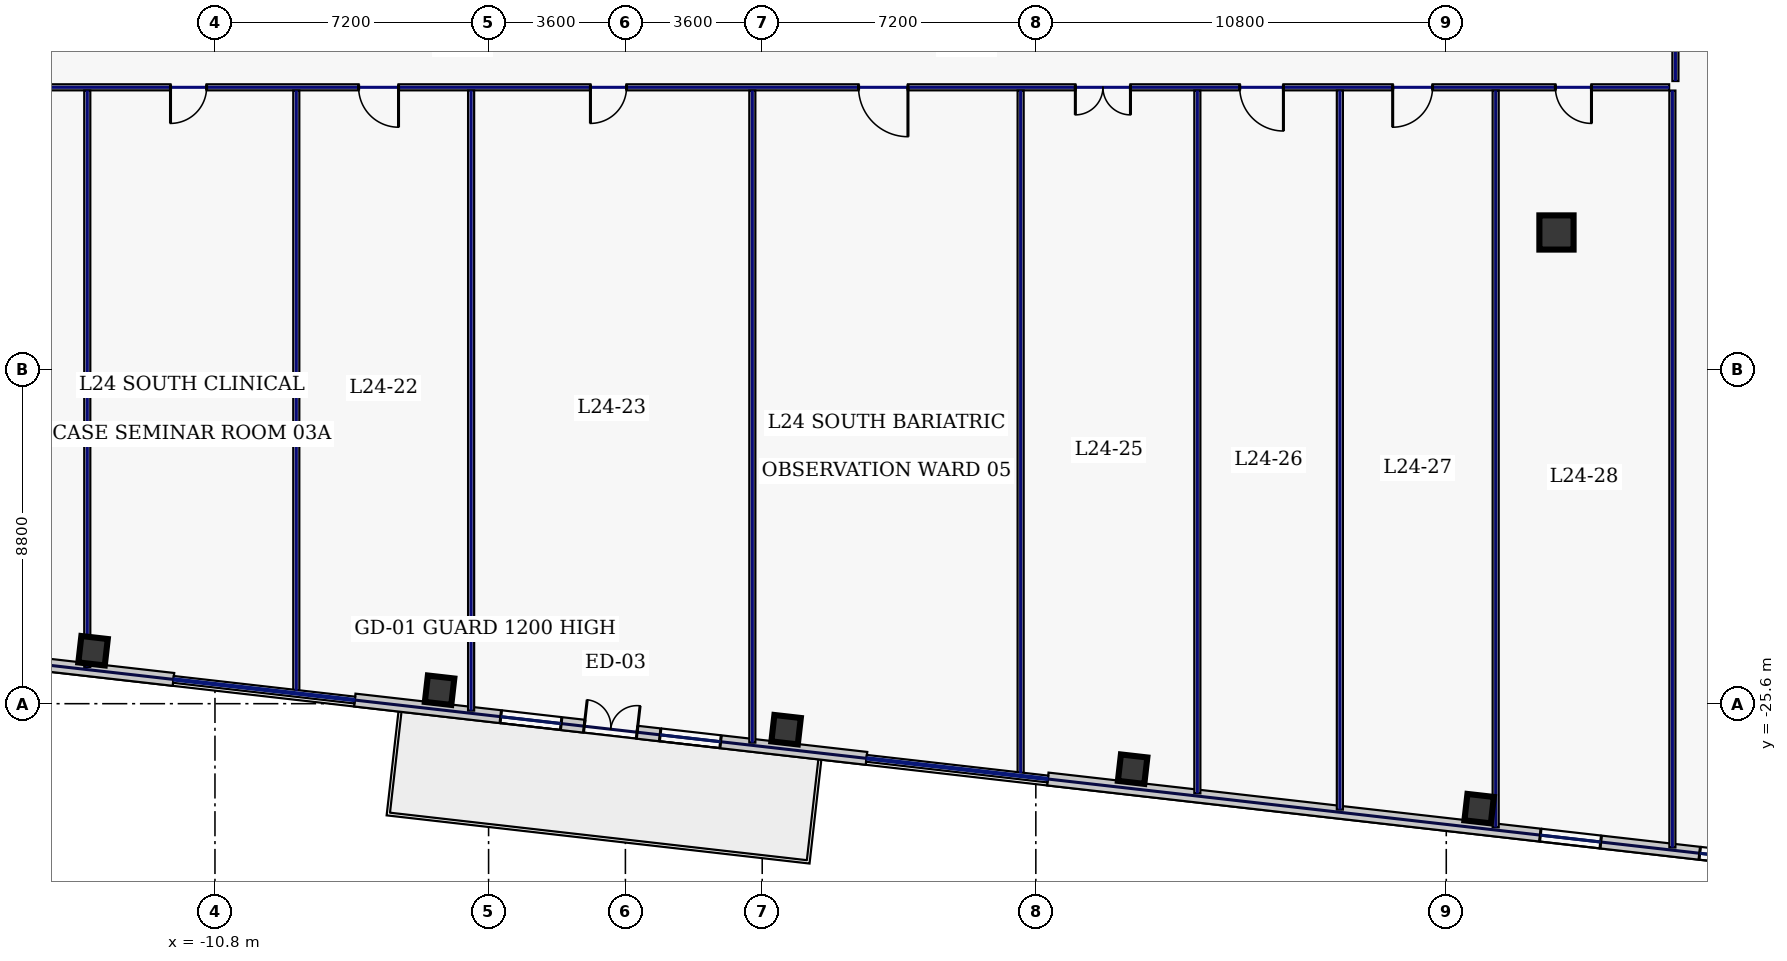
"""IFC4 building model, lengths in metres.
Left out: names, types, materials, properties, quantities, classifications, styles, units other than length and angle.
Written with IfcOpenShell. Run it as: python <this file> out.ifc"""

import sys

from ifc_helpers import new_model, si_unit, direction, frame, frame_2d, origin, origin_2d, place, context, subcontext, project, spatial, rectangle, hollow_rectangle, extrude, element, fill, save


model = new_model("IFC4")
c1 = context("Model", 3, precision=1e-05, world=origin(), true_north=direction((0.0, 1.0)))
c2 = subcontext(c1, "Body", "Model", "MODEL_VIEW")
j1 = project(units=[si_unit("LENGTHUNIT", "METRE"), si_unit("PLANEANGLEUNIT", "RADIAN")], contexts=[c1])
p1 = place(None, origin())
s1 = spatial("IfcSite", under=j1, at=p1, CompositionType="ELEMENT")
p2 = place(p1, origin())
s2 = spatial("IfcBuilding", under=s1, at=p2, CompositionType="ELEMENT")
p3 = place(p2, frame((0.0, 0.0, 109.4)))
s3 = spatial("IfcBuildingStorey", under=s2, at=p3, CompositionType="ELEMENT", Elevation=109.4)
p4 = place(p3, frame((24.5, -13.2, 0.0), z_axis=(0.0, 0.0, 1.0), x_axis=(1.0, 0.0, 0.0)))
e1 = element("IfcColumn", 1, at=p4, inside=s3, PredefinedType="COLUMN", context=c2, shape_type="SweptSolid", body=[
    extrude(hollow_rectangle(XDim=0.9, YDim=0.9, WallThickness=0.04, at=origin_2d()), origin(), (0.0, 0.0, 1.0), 3.74),
])
for number, where, z_axis, x_axis in (
    (2, (-14.008, -24.207, 0.0), (0.0, 0.0, 1.0), (0.994, -0.113, 0.0)),
    (3, (-4.89, -25.246, 0.0), (0.0, 0.0, 1.0), (0.994, -0.113, 0.0)),
    (4, (4.229, -26.284, 0.0), (0.0, 0.0, 1.0), (0.994, -0.113, 0.0)),
    (5, (13.347, -27.323, 0.0), (0.0, 0.0, 1.0), (0.994, -0.113, 0.0)),
    (6, (22.465, -28.362, 0.0), (0.0, 0.0, 1.0), (0.994, -0.113, 0.0)),
):
    element("IfcColumn", number, at=place(p3, frame(where, z_axis=z_axis, x_axis=x_axis)), inside=s3, PredefinedType="COLUMN", context=c2, shape_type="SweptSolid", body=[
        extrude(hollow_rectangle(XDim=0.7, YDim=0.7, WallThickness=0.032, at=origin_2d()), origin(), (0.0, 0.0, 1.0), 3.74),
    ])
p5 = place(p3, frame((-32.977, -22.559, 0.0), z_axis=(0.0, 0.0, 1.0), x_axis=(0.993571214605, -0.113208840243, 0.0)))
e7 = element("IfcWall", 7, at=p5, inside=s3, PredefinedType="STANDARD", context=c2, shape_type="SweptSolid", body=[
    extrude(rectangle(XDim=21.223, YDim=0.34, at=frame_2d((10.611, 0.0))), origin(), (0.0, 0.0, 1.0), 3.74),
])
p6 = place(p5, frame((2.358, 0.0, 0.22)))
e8 = element("IfcOpeningElement", 8, at=p6, cuts=e7, PredefinedType="OPENING", context=c2, shape_type="SweptSolid", body=[
    extrude(rectangle(XDim=1.6, YDim=1.2, at=frame_2d((0.8, 0.6))), frame((0.0, 0.18, 0.0), z_axis=(0.0, -1.0, 0.0), x_axis=(1.0, 0.0, 0.0)), (0.0, 0.0, 1.0), 0.36),
])
p7 = place(p5, frame((6.579, 0.0, 0.22)))
e9 = element("IfcOpeningElement", 9, at=p7, cuts=e7, PredefinedType="OPENING", context=c2, shape_type="SweptSolid", body=[
    extrude(rectangle(XDim=1.6, YDim=1.2, at=frame_2d((0.8, 0.6))), frame((0.0, 0.18, 0.0), z_axis=(0.0, -1.0, 0.0), x_axis=(1.0, 0.0, 0.0)), (0.0, 0.0, 1.0), 0.36),
])
p8 = place(p5, frame((11.535, 0.0, 0.22)))
e10 = element("IfcOpeningElement", 10, at=p8, cuts=e7, PredefinedType="OPENING", context=c2, shape_type="SweptSolid", body=[
    extrude(rectangle(XDim=1.6, YDim=1.2, at=frame_2d((0.8, 0.6))), frame((0.0, 0.18, 0.0), z_axis=(0.0, -1.0, 0.0), x_axis=(1.0, 0.0, 0.0)), (0.0, 0.0, 1.0), 0.36),
])
p9 = place(p5, frame((15.756, 0.0, 0.22)))
e11 = element("IfcOpeningElement", 11, at=p9, cuts=e7, PredefinedType="OPENING", context=c2, shape_type="SweptSolid", body=[
    extrude(rectangle(XDim=1.6, YDim=1.2, at=frame_2d((0.8, 0.6))), frame((0.0, 0.18, 0.0), z_axis=(0.0, -1.0, 0.0), x_axis=(1.0, 0.0, 0.0)), (0.0, 0.0, 1.0), 0.36),
])
p10 = place(p3, frame((-7.122, -25.504, 0.0), z_axis=(0.0, 0.0, 1.0), x_axis=(0.993571685551, -0.11320470693, 0.0)))
e12 = element("IfcWall", 12, at=p10, inside=s3, PredefinedType="STANDARD", context=c2, shape_type="SweptSolid", body=[
    extrude(rectangle(XDim=13.554, YDim=0.34, at=frame_2d((6.777, 0.0))), origin(), (0.0, 0.0, 1.0), 3.74),
])
p11 = place(p10, frame((6.077, 0.0, 0.0)))
e13 = element("IfcOpeningElement", 13, at=p11, cuts=e12, PredefinedType="OPENING", context=c2, shape_type="SweptSolid", body=[
    extrude(rectangle(XDim=1.4, YDim=2.2, at=frame_2d((0.7, 1.1))), frame((0.0, 0.18, 0.0), z_axis=(0.0, -1.0, 0.0), x_axis=(1.0, 0.0, 0.0)), (0.0, 0.0, 1.0), 0.36),
])
p12 = place(p10, frame((3.866, 0.0, 0.22)))
e14 = element("IfcOpeningElement", 14, at=p12, cuts=e12, PredefinedType="OPENING", context=c2, shape_type="SweptSolid", body=[
    extrude(rectangle(XDim=1.6, YDim=1.2, at=frame_2d((0.8, 0.6))), frame((0.0, 0.18, 0.0), z_axis=(0.0, -1.0, 0.0), x_axis=(1.0, 0.0, 0.0)), (0.0, 0.0, 1.0), 0.36),
])
p13 = place(p10, frame((8.088, 0.0, 0.22)))
e15 = element("IfcOpeningElement", 15, at=p13, cuts=e12, PredefinedType="OPENING", context=c2, shape_type="SweptSolid", body=[
    extrude(rectangle(XDim=1.6, YDim=1.2, at=frame_2d((0.8, 0.6))), frame((0.0, 0.18, 0.0), z_axis=(0.0, -1.0, 0.0), x_axis=(1.0, 0.0, 0.0)), (0.0, 0.0, 1.0), 0.36),
])
p14 = place(p3, frame((11.115, -27.582, 0.0), z_axis=(0.0, 0.0, 1.0), x_axis=(0.993572655904, -0.113196190044, 0.0)))
e16 = element("IfcWall", 16, at=p14, inside=s3, PredefinedType="STANDARD", context=c2, shape_type="SweptSolid", body=[
    extrude(rectangle(XDim=21.223, YDim=0.34, at=frame_2d((10.611, 0.0))), origin(), (0.0, 0.0, 1.0), 3.74),
])
p15 = place(p14, frame((13.044, 0.0, 0.22)))
e17 = element("IfcOpeningElement", 17, at=p15, cuts=e16, PredefinedType="OPENING", context=c2, shape_type="SweptSolid", body=[
    extrude(rectangle(XDim=1.6, YDim=1.2, at=frame_2d((0.8, 0.6))), frame((0.0, 0.18, 0.0), z_axis=(0.0, -1.0, 0.0), x_axis=(1.0, 0.0, 0.0)), (0.0, 0.0, 1.0), 0.36),
])
p16 = place(p14, frame((17.265, 0.0, 0.22)))
e18 = element("IfcOpeningElement", 18, at=p16, cuts=e16, PredefinedType="OPENING", context=c2, shape_type="SweptSolid", body=[
    extrude(rectangle(XDim=1.6, YDim=1.2, at=frame_2d((0.8, 0.6))), frame((0.0, 0.18, 0.0), z_axis=(0.0, -1.0, 0.0), x_axis=(1.0, 0.0, 0.0)), (0.0, 0.0, 1.0), 0.36),
])
p17 = place(p3, frame((27.63, 9.415, 0.0), z_axis=(0.0, 0.0, 1.0), x_axis=(0.0, -1.0, 0.0)))
e19 = element("IfcWall", 19, at=p17, inside=s3, PredefinedType="PARTITIONING", context=c2, shape_type="SweptSolid", body=[
    extrude(rectangle(XDim=18.63, YDim=0.16, at=frame_2d((9.315, 0.0))), origin(), (0.0, 0.0, 1.0), 3.74),
])
p18 = place(p17, frame((16.081, 0.0, 0.0)))
e20 = element("IfcOpeningElement", 20, at=p18, cuts=e19, PredefinedType="OPENING", context=c2, shape_type="SweptSolid", body=[
    extrude(rectangle(XDim=0.95, YDim=2.2, at=frame_2d((0.475, 1.1))), frame((0.0, 0.09, 0.0), z_axis=(0.0, -1.0, 0.0), x_axis=(1.0, 0.0, 0.0)), (0.0, 0.0, 1.0), 0.18),
])
p19 = place(p17, frame((12.25, 0.0, 0.0)))
e21 = element("IfcOpeningElement", 21, at=p19, cuts=e19, PredefinedType="OPENING", context=c2, shape_type="SweptSolid", body=[
    extrude(rectangle(XDim=0.95, YDim=2.2, at=frame_2d((0.475, 1.1))), frame((0.0, 0.09, 0.0), z_axis=(0.0, -1.0, 0.0), x_axis=(1.0, 0.0, 0.0)), (0.0, 0.0, 1.0), 0.18),
])
p20 = place(p17, frame((6.75, 0.0, 0.0)))
e22 = element("IfcOpeningElement", 22, at=p20, cuts=e19, PredefinedType="OPENING", context=c2, shape_type="SweptSolid", body=[
    extrude(rectangle(XDim=0.95, YDim=2.2, at=frame_2d((0.475, 1.1))), frame((0.0, 0.09, 0.0), z_axis=(0.0, -1.0, 0.0), x_axis=(1.0, 0.0, 0.0)), (0.0, 0.0, 1.0), 0.18),
])
p21 = place(p17, frame((1.869, 0.0, 0.0)))
e23 = element("IfcOpeningElement", 23, at=p21, cuts=e19, PredefinedType="OPENING", context=c2, shape_type="SweptSolid", body=[
    extrude(rectangle(XDim=0.95, YDim=2.2, at=frame_2d((0.475, 1.1))), frame((0.0, 0.09, 0.0), z_axis=(0.0, -1.0, 0.0), x_axis=(1.0, 0.0, 0.0)), (0.0, 0.0, 1.0), 0.18),
])
p22 = place(p3, frame((27.465, -9.38, 0.0), z_axis=(0.0, 0.0, 1.0), x_axis=(-1.0, 0.0, 0.0)))
e24 = element("IfcWall", 24, at=p22, inside=s3, PredefinedType="PARTITIONING", context=c2, shape_type="SweptSolid", body=[
    extrude(rectangle(XDim=54.93, YDim=0.16, at=frame_2d((27.465, 0.0))), origin(), (0.0, 0.0, 1.0), 3.74),
])
p23 = place(p22, frame((51.931, 0.0, 0.0)))
e25 = element("IfcOpeningElement", 25, at=p23, cuts=e24, PredefinedType="OPENING", context=c2, shape_type="SweptSolid", body=[
    extrude(rectangle(XDim=1.45, YDim=2.2, at=frame_2d((0.725, 1.1))), frame((0.0, 0.09, 0.0), z_axis=(0.0, -1.0, 0.0), x_axis=(1.0, 0.0, 0.0)), (0.0, 0.0, 1.0), 0.18),
])
p24 = place(p22, frame((45.605, 0.0, 0.0)))
e26 = element("IfcOpeningElement", 26, at=p24, cuts=e24, PredefinedType="OPENING", context=c2, shape_type="SweptSolid", body=[
    extrude(rectangle(XDim=0.95, YDim=2.2, at=frame_2d((0.475, 1.1))), frame((0.0, 0.09, 0.0), z_axis=(0.0, -1.0, 0.0), x_axis=(1.0, 0.0, 0.0)), (0.0, 0.0, 1.0), 0.18),
])
p25 = place(p22, frame((38.485, 0.0, 0.0)))
e27 = element("IfcOpeningElement", 27, at=p25, cuts=e24, PredefinedType="OPENING", context=c2, shape_type="SweptSolid", body=[
    extrude(rectangle(XDim=0.95, YDim=2.2, at=frame_2d((0.475, 1.1))), frame((0.0, 0.09, 0.0), z_axis=(0.0, -1.0, 0.0), x_axis=(1.0, 0.0, 0.0)), (0.0, 0.0, 1.0), 0.18),
])
p26 = place(p22, frame((33.435, 0.0, 0.0)))
e28 = element("IfcOpeningElement", 28, at=p26, cuts=e24, PredefinedType="OPENING", context=c2, shape_type="SweptSolid", body=[
    extrude(rectangle(XDim=1.05, YDim=2.2, at=frame_2d((0.525, 1.1))), frame((0.0, 0.09, 0.0), z_axis=(0.0, -1.0, 0.0), x_axis=(1.0, 0.0, 0.0)), (0.0, 0.0, 1.0), 0.18),
])
p27 = place(p22, frame((27.435, 0.0, 0.0)))
e29 = element("IfcOpeningElement", 29, at=p27, cuts=e24, PredefinedType="OPENING", context=c2, shape_type="SweptSolid", body=[
    extrude(rectangle(XDim=0.95, YDim=2.2, at=frame_2d((0.475, 1.1))), frame((0.0, 0.09, 0.0), z_axis=(0.0, -1.0, 0.0), x_axis=(1.0, 0.0, 0.0)), (0.0, 0.0, 1.0), 0.18),
])
p28 = place(p22, frame((20.03, 0.0, 0.0)))
e30 = element("IfcOpeningElement", 30, at=p28, cuts=e24, PredefinedType="OPENING", context=c2, shape_type="SweptSolid", body=[
    extrude(rectangle(XDim=1.3, YDim=2.2, at=frame_2d((0.65, 1.1))), frame((0.0, 0.09, 0.0), z_axis=(0.0, -1.0, 0.0), x_axis=(1.0, 0.0, 0.0)), (0.0, 0.0, 1.0), 0.18),
])
p29 = place(p22, frame((14.175, 0.0, 0.0)))
e31 = element("IfcOpeningElement", 31, at=p29, cuts=e24, PredefinedType="OPENING", context=c2, shape_type="SweptSolid", body=[
    extrude(rectangle(XDim=1.45, YDim=2.2, at=frame_2d((0.725, 1.1))), frame((0.0, 0.09, 0.0), z_axis=(0.0, -1.0, 0.0), x_axis=(1.0, 0.0, 0.0)), (0.0, 0.0, 1.0), 0.18),
])
p30 = place(p22, frame((10.15, 0.0, 0.0)))
e32 = element("IfcOpeningElement", 32, at=p30, cuts=e24, PredefinedType="OPENING", context=c2, shape_type="SweptSolid", body=[
    extrude(rectangle(XDim=1.15, YDim=2.2, at=frame_2d((0.575, 1.1))), frame((0.0, 0.09, 0.0), z_axis=(0.0, -1.0, 0.0), x_axis=(1.0, 0.0, 0.0)), (0.0, 0.0, 1.0), 0.18),
])
p31 = place(p22, frame((6.225, 0.0, 0.0)))
e33 = element("IfcOpeningElement", 33, at=p31, cuts=e24, PredefinedType="OPENING", context=c2, shape_type="SweptSolid", body=[
    extrude(rectangle(XDim=1.05, YDim=2.2, at=frame_2d((0.525, 1.1))), frame((0.0, 0.09, 0.0), z_axis=(0.0, -1.0, 0.0), x_axis=(1.0, 0.0, 0.0)), (0.0, 0.0, 1.0), 0.18),
])
p32 = place(p22, frame((2.044, 0.0, 0.0)))
e34 = element("IfcOpeningElement", 34, at=p32, cuts=e24, PredefinedType="OPENING", context=c2, shape_type="SweptSolid", body=[
    extrude(rectangle(XDim=0.95, YDim=2.2, at=frame_2d((0.475, 1.1))), frame((0.0, 0.09, 0.0), z_axis=(0.0, -1.0, 0.0), x_axis=(1.0, 0.0, 0.0)), (0.0, 0.0, 1.0), 0.18),
])
p33 = place(p3, frame((27.55, -29.385, 0.0), z_axis=(0.0, 0.0, 1.0), x_axis=(0.0, 1.0, 0.0)))
e35 = element("IfcWall", 35, at=p33, inside=s3, PredefinedType="PARTITIONING", context=c2, shape_type="SweptSolid", body=[
    extrude(rectangle(XDim=19.919, YDim=0.16, at=frame_2d((9.96, 0.0))), origin(), (0.0, 0.0, 1.0), 3.74),
])
p34 = place(p3, frame((-14.16, -24.632, 0.0), z_axis=(0.0, 0.0, 1.0), x_axis=(0.0, 1.0, 0.0)))
e36 = element("IfcWall", 36, at=p34, inside=s3, PredefinedType="PARTITIONING", context=c2, shape_type="SweptSolid", body=[
    extrude(rectangle(XDim=15.167, YDim=0.16, at=frame_2d((7.583, 0.0))), origin(), (0.0, 0.0, 1.0), 3.74),
])
p35 = place(p3, frame((-4.06, -25.783, 0.0), z_axis=(0.0, 0.0, 1.0), x_axis=(0.0, 1.0, 0.0)))
e37 = element("IfcWall", 37, at=p35, inside=s3, PredefinedType="PARTITIONING", context=c2, shape_type="SweptSolid", body=[
    extrude(rectangle(XDim=16.318, YDim=0.16, at=frame_2d((8.159, 0.0))), origin(), (0.0, 0.0, 1.0), 3.74),
])
p36 = place(p3, frame((3.34, -26.626, 0.0), z_axis=(0.0, 0.0, 1.0), x_axis=(0.0, 1.0, 0.0)))
e38 = element("IfcWall", 38, at=p36, inside=s3, PredefinedType="PARTITIONING", context=c2, shape_type="SweptSolid", body=[
    extrude(rectangle(XDim=17.161, YDim=0.16, at=frame_2d((8.581, 0.0))), origin(), (0.0, 0.0, 1.0), 3.74),
])
p37 = place(p3, frame((10.4, -27.43, 0.0), z_axis=(0.0, 0.0, 1.0), x_axis=(0.0, 1.0, 0.0)))
e39 = element("IfcWall", 39, at=p37, inside=s3, PredefinedType="PARTITIONING", context=c2, shape_type="SweptSolid", body=[
    extrude(rectangle(XDim=17.965, YDim=0.16, at=frame_2d((8.983, 0.0))), origin(), (0.0, 0.0, 1.0), 3.74),
])
p38 = place(p3, frame((18.8, -28.387, 0.0), z_axis=(0.0, 0.0, 1.0), x_axis=(0.0, 1.0, 0.0)))
e40 = element("IfcWall", 40, at=p38, inside=s3, PredefinedType="PARTITIONING", context=c2, shape_type="SweptSolid", body=[
    extrude(rectangle(XDim=18.922, YDim=0.16, at=frame_2d((9.461, 0.0))), origin(), (0.0, 0.0, 1.0), 3.74),
])
p39 = place(p3, frame((22.9, -28.854, 0.0), z_axis=(0.0, 0.0, 1.0), x_axis=(0.0, 1.0, 0.0)))
e41 = element("IfcWall", 41, at=p39, inside=s3, PredefinedType="PARTITIONING", context=c2, shape_type="SweptSolid", body=[
    extrude(rectangle(XDim=19.389, YDim=0.16, at=frame_2d((9.695, 0.0))), origin(), (0.0, 0.0, 1.0), 3.235),
])
p40 = place(p3, frame((-8.66, -25.259, 0.0), z_axis=(0.0, 0.0, 1.0), x_axis=(0.0, 1.0, 0.0)))
e42 = element("IfcWall", 42, at=p40, inside=s3, PredefinedType="PARTITIONING", context=c2, shape_type="SweptSolid", body=[
    extrude(rectangle(XDim=15.794, YDim=0.16, at=frame_2d((7.897, 0.0))), origin(), (0.0, 0.0, 1.0), 3.74),
])
p41 = place(p3, frame((15.05, -27.96, 0.0), z_axis=(0.0, 0.0, 1.0), x_axis=(0.0, 1.0, 0.0)))
e43 = element("IfcWall", 43, at=p41, inside=s3, PredefinedType="PARTITIONING", context=c2, shape_type="SweptSolid", body=[
    extrude(rectangle(XDim=18.495, YDim=0.16, at=frame_2d((9.248, 0.0))), origin(), (0.0, 0.0, 1.0), 3.74),
])
p42 = place(p11, origin())
e44 = element("IfcDoor", 44, at=p42, inside=s3, OperationType="DOUBLE_SWING_LEFT", PredefinedType="DOOR", context=c2, shape_type="SweptSolid", body=[
    extrude(rectangle(XDim=1.4, YDim=2.2, at=frame_2d((0.7, 1.1))), frame((0.0, 0.025, 0.0), z_axis=(0.0, -1.0, 0.0), x_axis=(1.0, 0.0, 0.0)), (0.0, 0.0, 1.0), 0.05),
])
fill(e13, e44)
p43 = place(p12, origin())
e45 = element("IfcWindow", 45, at=p43, inside=s3, PartitioningType="SINGLE_PANEL", PredefinedType="WINDOW", context=c2, shape_type="SweptSolid", body=[
    extrude(rectangle(XDim=1.6, YDim=1.2, at=frame_2d((0.8, 0.6))), frame((0.0, 0.03, 0.0), z_axis=(0.0, -1.0, 0.0), x_axis=(1.0, 0.0, 0.0)), (0.0, 0.0, 1.0), 0.06),
])
fill(e14, e45)
p44 = place(p13, origin())
e46 = element("IfcWindow", 46, at=p44, inside=s3, PartitioningType="SINGLE_PANEL", PredefinedType="WINDOW", context=c2, shape_type="SweptSolid", body=[
    extrude(rectangle(XDim=1.6, YDim=1.2, at=frame_2d((0.8, 0.6))), frame((0.0, 0.03, 0.0), z_axis=(0.0, -1.0, 0.0), x_axis=(1.0, 0.0, 0.0)), (0.0, 0.0, 1.0), 0.06),
])
fill(e15, e46)
p45 = place(p15, origin())
e47 = element("IfcWindow", 47, at=p45, inside=s3, PartitioningType="SINGLE_PANEL", PredefinedType="WINDOW", context=c2, shape_type="SweptSolid", body=[
    extrude(rectangle(XDim=1.6, YDim=1.2, at=frame_2d((0.8, 0.6))), frame((0.0, 0.03, 0.0), z_axis=(0.0, -1.0, 0.0), x_axis=(1.0, 0.0, 0.0)), (0.0, 0.0, 1.0), 0.06),
])
fill(e17, e47)
p46 = place(p16, origin())
e48 = element("IfcWindow", 48, at=p46, inside=s3, PartitioningType="SINGLE_PANEL", PredefinedType="WINDOW", context=c2, shape_type="SweptSolid", body=[
    extrude(rectangle(XDim=1.6, YDim=1.2, at=frame_2d((0.8, 0.6))), frame((0.0, 0.03, 0.0), z_axis=(0.0, -1.0, 0.0), x_axis=(1.0, 0.0, 0.0)), (0.0, 0.0, 1.0), 0.06),
])
fill(e18, e48)
p47 = place(p25, origin())
e49 = element("IfcDoor", 49, at=p47, inside=s3, OperationType="SINGLE_SWING_RIGHT", PredefinedType="DOOR", context=c2, shape_type="SweptSolid", body=[
    extrude(rectangle(XDim=0.95, YDim=2.2, at=frame_2d((0.475, 1.1))), frame((0.0, 0.025, 0.0), z_axis=(0.0, -1.0, 0.0), x_axis=(1.0, 0.0, 0.0)), (0.0, 0.0, 1.0), 0.05),
])
fill(e27, e49)
p48 = place(p26, origin())
e50 = element("IfcDoor", 50, at=p48, inside=s3, OperationType="SINGLE_SWING_LEFT", PredefinedType="DOOR", context=c2, shape_type="SweptSolid", body=[
    extrude(rectangle(XDim=1.05, YDim=2.2, at=frame_2d((0.525, 1.1))), frame((0.0, 0.025, 0.0), z_axis=(0.0, -1.0, 0.0), x_axis=(1.0, 0.0, 0.0)), (0.0, 0.0, 1.0), 0.05),
])
fill(e28, e50)
p49 = place(p27, origin())
e51 = element("IfcDoor", 51, at=p49, inside=s3, OperationType="SINGLE_SWING_RIGHT", PredefinedType="DOOR", context=c2, shape_type="SweptSolid", body=[
    extrude(rectangle(XDim=0.95, YDim=2.2, at=frame_2d((0.475, 1.1))), frame((0.0, 0.025, 0.0), z_axis=(0.0, -1.0, 0.0), x_axis=(1.0, 0.0, 0.0)), (0.0, 0.0, 1.0), 0.05),
])
fill(e29, e51)
p50 = place(p28, origin())
e52 = element("IfcDoor", 52, at=p50, inside=s3, OperationType="SINGLE_SWING_LEFT", PredefinedType="DOOR", context=c2, shape_type="SweptSolid", body=[
    extrude(rectangle(XDim=1.3, YDim=2.2, at=frame_2d((0.65, 1.1))), frame((0.0, 0.025, 0.0), z_axis=(0.0, -1.0, 0.0), x_axis=(1.0, 0.0, 0.0)), (0.0, 0.0, 1.0), 0.05),
])
fill(e30, e52)
p51 = place(p29, origin())
e53 = element("IfcDoor", 53, at=p51, inside=s3, OperationType="DOUBLE_SWING_LEFT", PredefinedType="DOOR", context=c2, shape_type="SweptSolid", body=[
    extrude(rectangle(XDim=1.45, YDim=2.2, at=frame_2d((0.725, 1.1))), frame((0.0, 0.025, 0.0), z_axis=(0.0, -1.0, 0.0), x_axis=(1.0, 0.0, 0.0)), (0.0, 0.0, 1.0), 0.05),
])
fill(e31, e53)
p52 = place(p30, origin())
e54 = element("IfcDoor", 54, at=p52, inside=s3, OperationType="SINGLE_SWING_LEFT", PredefinedType="DOOR", context=c2, shape_type="SweptSolid", body=[
    extrude(rectangle(XDim=1.15, YDim=2.2, at=frame_2d((0.575, 1.1))), frame((0.0, 0.025, 0.0), z_axis=(0.0, -1.0, 0.0), x_axis=(1.0, 0.0, 0.0)), (0.0, 0.0, 1.0), 0.05),
])
fill(e32, e54)
p53 = place(p31, origin())
e55 = element("IfcDoor", 55, at=p53, inside=s3, OperationType="SINGLE_SWING_RIGHT", PredefinedType="DOOR", context=c2, shape_type="SweptSolid", body=[
    extrude(rectangle(XDim=1.05, YDim=2.2, at=frame_2d((0.525, 1.1))), frame((0.0, 0.025, 0.0), z_axis=(0.0, -1.0, 0.0), x_axis=(1.0, 0.0, 0.0)), (0.0, 0.0, 1.0), 0.05),
])
fill(e33, e55)
p54 = place(p32, origin())
e56 = element("IfcDoor", 56, at=p54, inside=s3, OperationType="SINGLE_SWING_LEFT", PredefinedType="DOOR", context=c2, shape_type="SweptSolid", body=[
    extrude(rectangle(XDim=0.95, YDim=2.2, at=frame_2d((0.475, 1.1))), frame((0.0, 0.025, 0.0), z_axis=(0.0, -1.0, 0.0), x_axis=(1.0, 0.0, 0.0)), (0.0, 0.0, 1.0), 0.05),
])
fill(e34, e56)
save(model, sys.argv[1])
